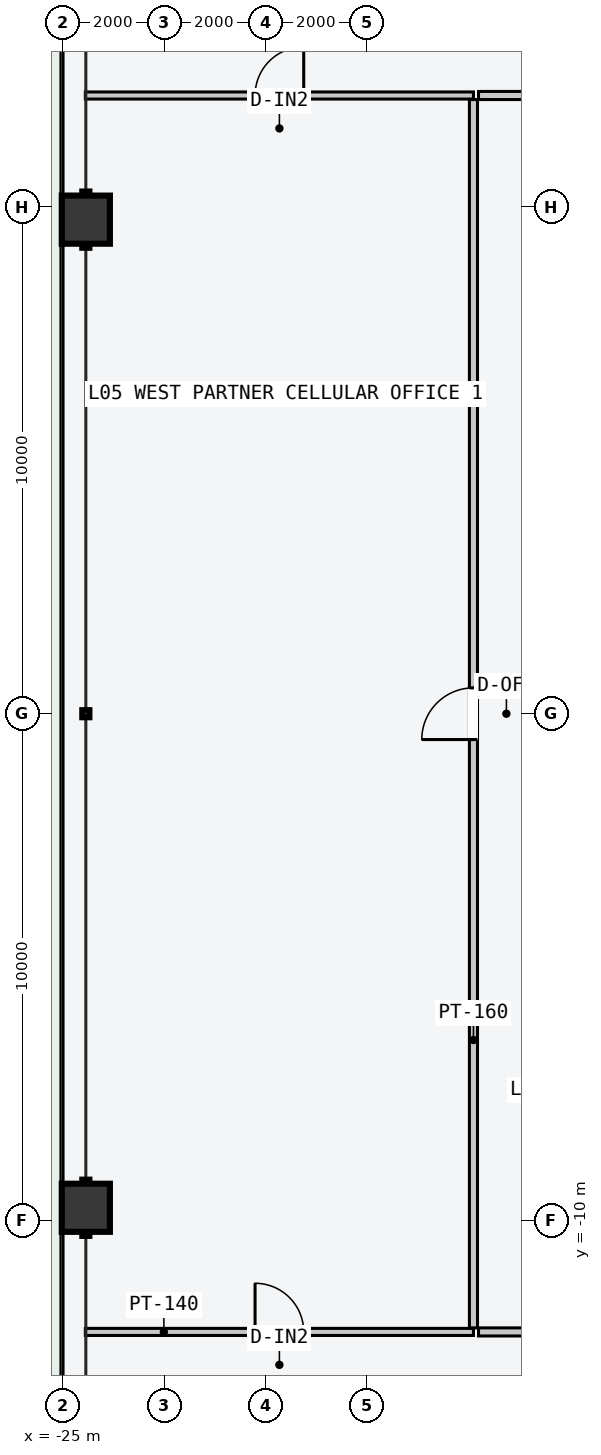
"""IFC4 building model, lengths in metres.
Left out: names, types, materials, properties, quantities, classifications, styles, units other than length and angle.
Written with IfcOpenShell. Run it as: python <this file> out.ifc"""

import sys

from ifc_helpers import new_model, si_unit, direction, frame, frame_2d, origin, origin_2d, place, context, subcontext, project, spatial, rectangle, hollow_rectangle, extrude, element, fill, save


model = new_model("IFC4")
c1 = context("Model", 3, precision=1e-05, world=origin(), true_north=direction((0.0, 1.0)))
c2 = subcontext(c1, "Body", "Model", "MODEL_VIEW")
j1 = project(units=[si_unit("LENGTHUNIT", "METRE"), si_unit("PLANEANGLEUNIT", "RADIAN")], contexts=[c1])
p1 = place(None, origin())
s1 = spatial("IfcSite", under=j1, at=p1, CompositionType="ELEMENT")
p2 = place(p1, origin())
s2 = spatial("IfcBuilding", under=s1, at=p2, CompositionType="ELEMENT")
p3 = place(p2, frame((0.0, 0.0, 24.0)))
s3 = spatial("IfcBuildingStorey", under=s2, at=p3, CompositionType="ELEMENT", Elevation=24.0)
for number, where, z_axis, x_axis in (
    (1, (-24.55, -9.75, -0.2), (0.0, 0.0, 1.0), (0.0, 1.0, 0.0)),
    (2, (-24.55, 9.75, -0.2), (0.0, 0.0, 1.0), (0.0, 1.0, 0.0)),
):
    element("IfcColumn", number, at=place(p3, frame(where, z_axis=z_axis, x_axis=x_axis)), inside=s3, PredefinedType="COLUMN", context=c2, shape_type="SweptSolid", body=[
        extrude(hollow_rectangle(XDim=0.95, YDim=0.95, WallThickness=0.048, at=origin_2d()), origin(), (0.0, 0.0, 1.0), 3.8),
    ])
p4 = place(p3, frame((-16.8, 12.2, 0.0), z_axis=(0.0, 0.0, 1.0), x_axis=(1.0, 0.0, 0.0)))
e3 = element("IfcWall", 3, at=p4, inside=s3, PredefinedType="PARTITIONING", context=c2, shape_type="SweptSolid", body=[
    extrude(rectangle(XDim=33.6, YDim=0.16, at=frame_2d((16.8, 0.0))), origin(), (0.0, 0.0, 1.0), 1.74),
])
p5 = place(p3, frame((-24.56, 12.2, 0.0), z_axis=(0.0, 0.0, 1.0), x_axis=(1.0, 0.0, 0.0)))
e4 = element("IfcWall", 4, at=p5, inside=s3, PredefinedType="PARTITIONING", context=c2, shape_type="SweptSolid", body=[
    extrude(rectangle(XDim=7.66, YDim=0.14, at=frame_2d((3.83, 0.0))), origin(), (0.0, 0.0, 1.0), 3.4),
])
p6 = place(p5, frame((3.35, 0.0, 0.0)))
e5 = element("IfcOpeningElement", 5, at=p6, cuts=e4, PredefinedType="OPENING", context=c2, shape_type="SweptSolid", body=[
    extrude(rectangle(XDim=0.96, YDim=2.18, at=frame_2d((0.48, 1.09))), frame((0.0, 0.08, 0.0), z_axis=(0.0, -1.0, 0.0), x_axis=(1.0, 0.0, 0.0)), (0.0, 0.0, 1.0), 0.16),
])
p7 = place(p3, frame((-16.8, -12.2, 0.0), z_axis=(0.0, 0.0, 1.0), x_axis=(1.0, 0.0, 0.0)))
e6 = element("IfcWall", 6, at=p7, inside=s3, PredefinedType="PARTITIONING", context=c2, shape_type="SweptSolid", body=[
    extrude(rectangle(XDim=33.6, YDim=0.16, at=frame_2d((16.8, 0.0))), origin(), (0.0, 0.0, 1.0), 3.4),
])
p8 = place(p7, frame((6.585, 0.0, 0.0)))
e7 = element("IfcOpeningElement", 7, at=p8, cuts=e6, PredefinedType="OPENING", context=c2, shape_type="SweptSolid", body=[
    extrude(rectangle(XDim=1.24, YDim=2.24, at=frame_2d((0.62, 1.12))), frame((0.0, 0.09, 0.0), z_axis=(0.0, -1.0, 0.0), x_axis=(1.0, 0.0, 0.0)), (0.0, 0.0, 1.0), 0.18),
])
p9 = place(p7, frame((19.883, 0.0, 0.0)))
e8 = element("IfcOpeningElement", 8, at=p9, cuts=e6, PredefinedType="OPENING", context=c2, shape_type="SweptSolid", body=[
    extrude(rectangle(XDim=1.4, YDim=2.2, at=frame_2d((0.7, 1.1))), frame((0.0, 0.09, 0.0), z_axis=(0.0, -1.0, 0.0), x_axis=(1.0, 0.0, 0.0)), (0.0, 0.0, 1.0), 0.18),
])
p10 = place(p7, frame((29.728, 0.0, 0.0)))
e9 = element("IfcOpeningElement", 9, at=p10, cuts=e6, PredefinedType="OPENING", context=c2, shape_type="SweptSolid", body=[
    extrude(rectangle(XDim=0.9, YDim=2.15, at=frame_2d((0.45, 1.075))), frame((0.0, 0.09, 0.0), z_axis=(0.0, -1.0, 0.0), x_axis=(1.0, 0.0, 0.0)), (0.0, 0.0, 1.0), 0.18),
])
p11 = place(p3, frame((-24.56, -12.2, 0.0), z_axis=(0.0, 0.0, 1.0), x_axis=(1.0, 0.0, 0.0)))
e10 = element("IfcWall", 10, at=p11, inside=s3, PredefinedType="PARTITIONING", context=c2, shape_type="SweptSolid", body=[
    extrude(rectangle(XDim=7.66, YDim=0.14, at=frame_2d((3.83, 0.0))), origin(), (0.0, 0.0, 1.0), 3.4),
])
p12 = place(p11, frame((3.35, 0.0, 0.0)))
e11 = element("IfcOpeningElement", 11, at=p12, cuts=e10, PredefinedType="OPENING", context=c2, shape_type="SweptSolid", body=[
    extrude(rectangle(XDim=0.96, YDim=2.18, at=frame_2d((0.48, 1.09))), frame((0.0, 0.08, 0.0), z_axis=(0.0, -1.0, 0.0), x_axis=(1.0, 0.0, 0.0)), (0.0, 0.0, 1.0), 0.16),
])
p13 = place(p3, frame((-16.9, -12.12, 0.0), z_axis=(0.0, 0.0, 1.0), x_axis=(0.0, 1.0, 0.0)))
e12 = element("IfcWall", 12, at=p13, inside=s3, PredefinedType="PARTITIONING", context=c2, shape_type="SweptSolid", body=[
    extrude(rectangle(XDim=24.24, YDim=0.16, at=frame_2d((12.12, 0.0))), origin(), (0.0, 0.0, 1.0), 3.4),
])
p14 = place(p13, frame((11.61, 0.0, 0.0)))
e13 = element("IfcOpeningElement", 13, at=p14, cuts=e12, PredefinedType="OPENING", context=c2, shape_type="SweptSolid", body=[
    extrude(rectangle(XDim=1.02, YDim=2.2, at=frame_2d((0.51, 1.1))), frame((0.0, 0.09, 0.0), z_axis=(0.0, -1.0, 0.0), x_axis=(1.0, 0.0, 0.0)), (0.0, 0.0, 1.0), 0.18),
])
p15 = place(p6, origin())
e14 = element("IfcDoor", 14, at=p15, inside=s3, OperationType="SINGLE_SWING_RIGHT", PredefinedType="DOOR", context=c2, shape_type="SweptSolid", body=[
    extrude(rectangle(XDim=0.96, YDim=2.18, at=frame_2d((0.48, 1.09))), frame((0.0, 0.025, 0.0), z_axis=(0.0, -1.0, 0.0), x_axis=(1.0, 0.0, 0.0)), (0.0, 0.0, 1.0), 0.05),
])
fill(e5, e14)
p16 = place(p12, origin())
e15 = element("IfcDoor", 15, at=p16, inside=s3, OperationType="SINGLE_SWING_LEFT", PredefinedType="DOOR", context=c2, shape_type="SweptSolid", body=[
    extrude(rectangle(XDim=0.96, YDim=2.18, at=frame_2d((0.48, 1.09))), frame((0.0, 0.025, 0.0), z_axis=(0.0, -1.0, 0.0), x_axis=(1.0, 0.0, 0.0)), (0.0, 0.0, 1.0), 0.05),
])
fill(e11, e15)
p17 = place(p14, origin())
e16 = element("IfcDoor", 16, at=p17, inside=s3, OperationType="SINGLE_SWING_LEFT", PredefinedType="DOOR", context=c2, shape_type="SweptSolid", body=[
    extrude(rectangle(XDim=1.02, YDim=2.2, at=frame_2d((0.51, 1.1))), frame((0.0, 0.025, 0.0), z_axis=(0.0, -1.0, 0.0), x_axis=(1.0, 0.0, 0.0)), (0.0, 0.0, 1.0), 0.05),
])
fill(e13, e16)
save(model, sys.argv[1])
